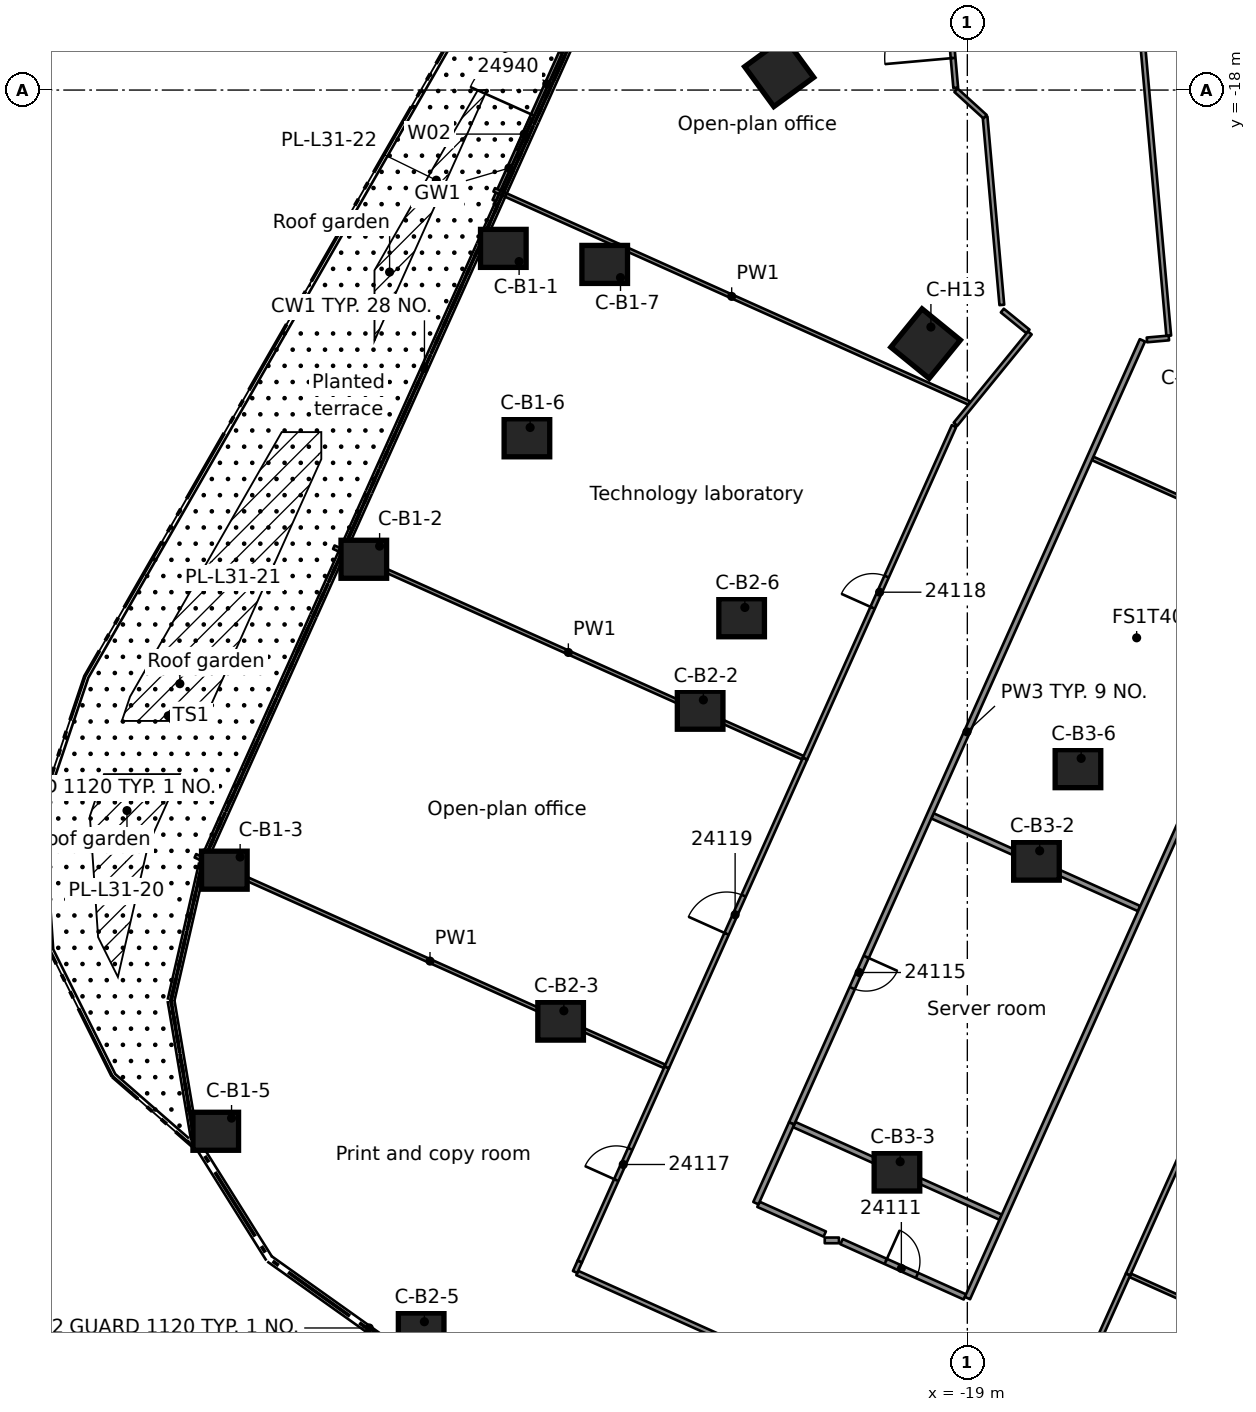
"""IFC4 building model, lengths in metres.
Left out: names, types, materials, properties, quantities, classifications, styles, units other than length and angle.
Written with IfcOpenShell. Run it as: python <this file> out.ifc"""

import sys

from ifc_helpers import new_model, si_unit, direction, frame, frame_2d, origin, origin_2d, place, context, subcontext, project, spatial, rectangle, extrude, element, fill, save


model = new_model("IFC4")
c1 = context("Model", 3, precision=1e-05, world=origin(), true_north=direction((0.0, 1.0)))
c2 = subcontext(c1, "Body", "Model", "MODEL_VIEW")
j1 = project(units=[si_unit("LENGTHUNIT", "METRE"), si_unit("PLANEANGLEUNIT", "RADIAN")], contexts=[c1])
p1 = place(None, origin())
s1 = spatial("IfcSite", under=j1, at=p1, CompositionType="ELEMENT")
p2 = place(p1, origin())
s2 = spatial("IfcBuilding", under=s1, at=p2, CompositionType="ELEMENT")
p3 = place(p2, frame((0.0, 0.0, 123.7)))
s3 = spatial("IfcBuildingStorey", under=s2, at=p3, CompositionType="ELEMENT", Elevation=123.7)
for number, where, z_axis, x_axis in (
    (1, (-31.21, -22.166, 0.0), (0.0, 0.0, 1.0), (1.0, 0.0, 0.0)),
    (2, (-34.881, -30.346, 0.0), (0.0, 0.0, 1.0), (1.0, 0.0, 0.0)),
    (3, (-38.551, -38.527, 0.0), (0.0, 0.0, 1.0), (1.0, 0.0, 0.0)),
    (4, (-38.777, -45.397, 0.0), (0.0, 0.0, 1.0), (1.0, 0.0, 0.0)),
    (5, (-30.589, -27.15, 0.0), (0.0, 0.0, 1.0), (1.0, 0.0, 0.0)),
    (6, (-28.542, -22.588, 0.0), (0.0, 0.0, 1.0), (1.0, 0.0, 0.0)),
    (7, (-26.031, -34.318, 0.0), (0.0, 0.0, 1.0), (1.0, 0.0, 0.0)),
    (8, (-29.702, -42.498, 0.0), (0.0, 0.0, 1.0), (1.0, 0.0, 0.0)),
    (9, (-33.372, -50.679, 0.0), (0.0, 0.0, 1.0), (1.0, 0.0, 0.0)),
    (10, (-24.939, -31.885, 0.0), (0.0, 0.0, 1.0), (1.0, 0.0, 0.0)),
    (11, (-17.181, -38.289, 0.0), (0.0, 0.0, 1.0), (1.0, 0.0, 0.0)),
    (12, (-20.852, -46.469, 0.0), (0.0, 0.0, 1.0), (1.0, 0.0, 0.0)),
    (13, (-16.089, -35.856, 0.0), (0.0, 0.0, 1.0), (1.0, 0.0, 0.0)),
):
    element("IfcColumn", number, at=place(p3, frame(where, z_axis=z_axis, x_axis=x_axis)), inside=s3, PredefinedType="COLUMN", context=c2, shape_type="SweptSolid", body=[
        extrude(rectangle(XDim=1.2, YDim=1.0, at=origin_2d()), origin(), (0.0, 0.0, 1.0), 3.5),
    ])
for number, where, z_axis, x_axis in (
    (14, (-20.098, -24.672, 0.0), (0.0, 0.0, 1.0), (-0.632, -0.775, 0.0)),
    (15, (-23.951, -17.526, 0.0), (0.0, 0.0, 1.0), (-0.807, -0.591, 0.0)),
):
    element("IfcColumn", number, at=place(p3, frame(where, z_axis=z_axis, x_axis=x_axis)), inside=s3, PredefinedType="COLUMN", context=c2, shape_type="SweptSolid", body=[
        extrude(rectangle(XDim=1.3, YDim=1.3, at=origin_2d()), origin(), (0.0, 0.0, 1.0), 3.5),
    ])
p4 = place(p3, frame((-31.447, -20.912, 0.0), z_axis=(0.0, 0.0, 1.0), x_axis=(0.409400034272, 0.912354981319, 0.0)))
e16 = element("IfcWall", 16, at=p4, inside=s3, PredefinedType="STANDARD", context=c2, shape_type="SweptSolid", body=[
    extrude(rectangle(XDim=4.705, YDim=0.1, at=frame_2d((2.353, 0.0))), origin(), (0.0, 0.0, 1.0), 3.1),
])
p5 = place(p4, frame((2.472, 0.0, 0.0)))
e17 = element("IfcOpeningElement", 17, at=p5, cuts=e16, PredefinedType="OPENING", context=c2, shape_type="SweptSolid", body=[
    extrude(rectangle(XDim=1.8, YDim=2.4, at=frame_2d((0.9, 1.2))), frame((0.0, 0.06, 0.0), z_axis=(0.0, -1.0, 0.0), x_axis=(1.0, 0.0, 0.0)), (0.0, 0.0, 1.0), 0.12),
])
p6 = place(p4, frame((1.472, 0.0, 0.0)))
e18 = element("IfcOpeningElement", 18, at=p6, cuts=e16, PredefinedType="OPENING", context=c2, shape_type="SweptSolid", body=[
    extrude(rectangle(XDim=0.9, YDim=2.4, at=frame_2d((0.45, 1.2))), frame((0.0, 0.06, 0.0), z_axis=(0.0, -1.0, 0.0), x_axis=(1.0, 0.0, 0.0)), (0.0, 0.0, 1.0), 0.12),
])
p7 = place(p3, frame((-19.305, -17.942, 0.0), z_axis=(0.0, 0.0, 1.0), x_axis=(-0.088649243985, 0.996062905414, 0.0)))
e19 = element("IfcWall", 19, at=p7, inside=s3, PredefinedType="PARTITIONING", context=c2, shape_type="SweptSolid", body=[
    extrude(rectangle(XDim=3.443, YDim=0.125, at=frame_2d((1.721, 0.0))), origin(), (0.0, 0.0, 1.0), 3.08),
])
p8 = place(p7, frame((0.788, 0.0, 0.0)))
e20 = element("IfcOpeningElement", 20, at=p8, cuts=e19, PredefinedType="OPENING", context=c2, shape_type="SweptSolid", body=[
    extrude(rectangle(XDim=1.8, YDim=2.1, at=frame_2d((0.9, 1.05))), frame((0.0, 0.073, 0.0), z_axis=(0.0, -1.0, 0.0), x_axis=(1.0, 0.0, 0.0)), (0.0, 0.0, 1.0), 0.145),
])
p9 = place(p3, frame((-18.533, -18.702, 0.0), z_axis=(0.0, 0.0, 1.0), x_axis=(0.088684868858, -0.99605973417, 0.0)))
e21 = element("IfcWall", 21, at=p9, inside=s3, PredefinedType="PARTITIONING", context=c2, shape_type="SweptSolid", body=[
    extrude(rectangle(XDim=4.972, YDim=0.125, at=frame_2d((2.486, 0.0))), origin(), (0.0, 0.0, 1.0), 3.08),
])
p10 = place(p3, frame((-14.589, -14.513, 0.0), z_axis=(0.0, 0.0, 1.0), x_axis=(0.088989077037, -0.99603260196, 0.0)))
e22 = element("IfcWall", 22, at=p10, inside=s3, PredefinedType="PARTITIONING", context=c2, shape_type="SweptSolid", body=[
    extrude(rectangle(XDim=9.992, YDim=0.125, at=frame_2d((4.996, 0.0))), origin(), (0.0, 0.0, 1.0), 3.08),
])
p11 = place(p3, frame((-18.079, -23.802, 0.0), z_axis=(0.0, 0.0, 1.0), x_axis=(0.775128356152, -0.631803791923, 0.0)))
e23 = element("IfcWall", 23, at=p11, inside=s3, PredefinedType="PARTITIONING", context=c2, shape_type="SweptSolid", body=[
    extrude(rectangle(XDim=0.872, YDim=0.125, at=frame_2d((0.436, 0.0))), origin(), (0.0, 0.0, 1.0), 3.08),
])
p12 = place(p3, frame((-17.239, -54.521, 0.0), z_axis=(0.0, 0.0, 1.0), x_axis=(-0.912380528424, 0.409343097355, 0.0)))
e24 = element("IfcWall", 24, at=p12, inside=s3, PredefinedType="PARTITIONING", context=c2, shape_type="SweptSolid", body=[
    extrude(rectangle(XDim=13.18, YDim=0.125, at=frame_2d((6.59, 0.0))), origin(), (0.0, 0.0, 1.0), 3.08),
])
p13 = place(p12, frame((2.792, 0.0, 0.0)))
e25 = element("IfcOpeningElement", 25, at=p13, cuts=e24, PredefinedType="OPENING", context=c2, shape_type="SweptSolid", body=[
    extrude(rectangle(XDim=0.9, YDim=2.1, at=frame_2d((0.45, 1.05))), frame((0.0, 0.073, 0.0), z_axis=(0.0, -1.0, 0.0), x_axis=(1.0, 0.0, 0.0)), (0.0, 0.0, 1.0), 0.145),
])
p14 = place(p3, frame((-24.496, -47.319, 0.0), z_axis=(0.0, 0.0, 1.0), x_axis=(0.912484662613, -0.409110914663, 0.0)))
e26 = element("IfcWall", 26, at=p14, inside=s3, PredefinedType="PARTITIONING", context=c2, shape_type="SweptSolid", body=[
    extrude(rectangle(XDim=1.911, YDim=0.15, at=frame_2d((0.956, 0.0))), origin(), (0.0, 0.0, 1.0), 3.08),
])
p15 = place(p3, frame((-22.31, -48.3, 0.0), z_axis=(0.0, 0.0, 1.0), x_axis=(0.912496069824, -0.409085470966, 0.0)))
e27 = element("IfcWall", 27, at=p15, inside=s3, PredefinedType="PARTITIONING", context=c2, shape_type="SweptSolid", body=[
    extrude(rectangle(XDim=3.556, YDim=0.15, at=frame_2d((1.778, 0.0))), origin(), (0.0, 0.0, 1.0), 3.08),
])
p16 = place(p15, frame((1.275, 0.0, 0.0)))
e28 = element("IfcOpeningElement", 28, at=p16, cuts=e27, PredefinedType="OPENING", context=c2, shape_type="SweptSolid", body=[
    extrude(rectangle(XDim=0.9, YDim=2.1, at=frame_2d((0.45, 1.05))), frame((0.0, 0.085, 0.0), z_axis=(0.0, -1.0, 0.0), x_axis=(1.0, 0.0, 0.0)), (0.0, 0.0, 1.0), 0.17),
])
p17 = place(p3, frame((-39.313, -38.149, 0.0), z_axis=(0.0, 0.0, 1.0), x_axis=(0.912365533099, -0.409376518638, 0.0)))
e29 = element("IfcWall", 29, at=p17, inside=s3, PredefinedType="PARTITIONING", context=c2, shape_type="SweptSolid", body=[
    extrude(rectangle(XDim=13.533, YDim=0.1, at=frame_2d((6.767, 0.0))), origin(), (0.0, 0.0, 1.0), 3.08),
])
p18 = place(p3, frame((-23.556, -45.22, 0.0), z_axis=(0.0, 0.0, 1.0), x_axis=(0.912409553787, -0.409278396886, 0.0)))
e30 = element("IfcWall", 30, at=p18, inside=s3, PredefinedType="PARTITIONING", context=c2, shape_type="SweptSolid", body=[
    extrude(rectangle(XDim=5.954, YDim=0.15, at=frame_2d((2.977, 0.0))), origin(), (0.0, 0.0, 1.0), 3.08),
])
p19 = place(p3, frame((-14.713, -49.188, 0.0), z_axis=(0.0, 0.0, 1.0), x_axis=(0.912374858899, -0.409355733865, 0.0)))
e31 = element("IfcWall", 31, at=p19, inside=s3, PredefinedType="PARTITIONING", context=c2, shape_type="SweptSolid", body=[
    extrude(rectangle(XDim=13.536, YDim=0.1, at=frame_2d((6.768, 0.0))), origin(), (0.0, 0.0, 1.0), 3.08),
])
p20 = place(p3, frame((-35.67, -30.029, 0.0), z_axis=(0.0, 0.0, 1.0), x_axis=(0.912365708641, -0.409376127413, 0.0)))
e32 = element("IfcWall", 32, at=p20, inside=s3, PredefinedType="PARTITIONING", context=c2, shape_type="SweptSolid", body=[
    extrude(rectangle(XDim=13.528, YDim=0.1, at=frame_2d((6.764, 0.0))), origin(), (0.0, 0.0, 1.0), 3.08),
])
p21 = place(p3, frame((-19.917, -37.098, 0.0), z_axis=(0.0, 0.0, 1.0), x_axis=(0.912388526433, -0.409325270211, 0.0)))
e33 = element("IfcWall", 33, at=p21, inside=s3, PredefinedType="PARTITIONING", context=c2, shape_type="SweptSolid", body=[
    extrude(rectangle(XDim=5.959, YDim=0.15, at=frame_2d((2.979, 0.0))), origin(), (0.0, 0.0, 1.0), 3.08),
])
p22 = place(p3, frame((-31.45, -20.625, 0.0), z_axis=(0.0, 0.0, 1.0), x_axis=(0.912363829072, -0.409380316334, 0.0)))
e34 = element("IfcWall", 34, at=p22, inside=s3, PredefinedType="PARTITIONING", context=c2, shape_type="SweptSolid", body=[
    extrude(rectangle(XDim=13.698, YDim=0.1, at=frame_2d((6.849, 0.0))), origin(), (0.0, 0.0, 1.0), 3.08),
])
p23 = place(p3, frame((-15.704, -27.692, 0.0), z_axis=(0.0, 0.0, 1.0), x_axis=(0.912424912587, -0.409244155597, 0.0)))
e35 = element("IfcWall", 35, at=p23, inside=s3, PredefinedType="PARTITIONING", context=c2, shape_type="SweptSolid", body=[
    extrude(rectangle(XDim=5.809, YDim=0.1, at=frame_2d((2.904, 0.0))), origin(), (0.0, 0.0, 1.0), 3.08),
])
p24 = place(p3, frame((-22.752, -48.268, 0.0), z_axis=(0.0, 0.0, 1.0), x_axis=(1.0, 0.0, 0.0)))
e36 = element("IfcWall", 36, at=p24, inside=s3, PredefinedType="PARTITIONING", context=c2, shape_type="SweptSolid", body=[
    extrude(rectangle(XDim=0.374, YDim=0.15, at=frame_2d((0.187, 0.0))), origin(), (0.0, 0.0, 1.0), 3.08),
])
p25 = place(p3, frame((-14.274, -24.574, 0.0), z_axis=(0.0, 0.0, 1.0), x_axis=(0.996111374158, 0.088102952687, 0.0)))
e37 = element("IfcWall", 37, at=p25, inside=s3, PredefinedType="PARTITIONING", context=c2, shape_type="SweptSolid", body=[
    extrude(rectangle(XDim=0.579, YDim=0.125, at=frame_2d((0.29, 0.0))), origin(), (0.0, 0.0, 1.0), 3.08),
])
p26 = place(p3, frame((-19.298, -18.005, 0.0), z_axis=(0.0, 0.0, 1.0), x_axis=(0.739245917037, -0.673435575348, 0.0)))
e38 = element("IfcWall", 38, at=p26, inside=s3, PredefinedType="PARTITIONING", context=c2, shape_type="SweptSolid", body=[
    extrude(rectangle(XDim=1.035, YDim=0.125, at=frame_2d((0.518, 0.0))), origin(), (0.0, 0.0, 1.0), 3.08),
])
p27 = place(p3, frame((-19.311, -26.793, 0.0), z_axis=(0.0, 0.0, 1.0), x_axis=(0.631476442345, 0.77539506238, 0.0)))
e39 = element("IfcWall", 39, at=p27, inside=s3, PredefinedType="PARTITIONING", context=c2, shape_type="SweptSolid", body=[
    extrude(rectangle(XDim=3.098, YDim=0.125, at=frame_2d((1.549, 0.0))), origin(), (0.0, 0.0, 1.0), 3.08),
])
p28 = place(p3, frame((-15.712, -51.26, 0.0), z_axis=(0.0, 0.0, 1.0), x_axis=(0.409583190249, 0.912272771854, 0.0)))
e40 = element("IfcWall", 40, at=p28, inside=s3, PredefinedType="PARTITIONING", context=c2, shape_type="SweptSolid", body=[
    extrude(rectangle(XDim=2.3, YDim=0.125, at=frame_2d((1.15, 0.0))), origin(), (0.0, 0.0, 1.0), 3.08),
])
p29 = place(p3, frame((-6.789, -31.374, 0.0), z_axis=(0.0, 0.0, 1.0), x_axis=(-0.409354309939, -0.912375497772, 0.0)))
e41 = element("IfcWall", 41, at=p29, inside=s3, PredefinedType="PARTITIONING", context=c2, shape_type="SweptSolid", body=[
    extrude(rectangle(XDim=19.496, YDim=0.125, at=frame_2d((9.748, 0.0))), origin(), (0.0, 0.0, 1.0), 3.08),
])
p30 = place(p29, frame((4.639, 0.0, 0.0)))
e42 = element("IfcOpeningElement", 42, at=p30, cuts=e41, PredefinedType="OPENING", context=c2, shape_type="SweptSolid", body=[
    extrude(rectangle(XDim=1.8, YDim=2.1, at=frame_2d((0.9, 1.05))), frame((0.0, 0.073, 0.0), z_axis=(0.0, -1.0, 0.0), x_axis=(1.0, 0.0, 0.0)), (0.0, 0.0, 1.0), 0.145),
])
p31 = place(p29, frame((14.697, 0.0, 0.0)))
e43 = element("IfcOpeningElement", 43, at=p31, cuts=e41, PredefinedType="OPENING", context=c2, shape_type="SweptSolid", body=[
    extrude(rectangle(XDim=0.9, YDim=2.1, at=frame_2d((0.45, 1.05))), frame((0.0, 0.073, 0.0), z_axis=(0.0, -1.0, 0.0), x_axis=(1.0, 0.0, 0.0)), (0.0, 0.0, 1.0), 0.145),
])
p32 = place(p3, frame((-18.997, -49.786, 0.0), z_axis=(0.0, 0.0, 1.0), x_axis=(0.409621859923, 0.912255409342, 0.0)))
e44 = element("IfcWall", 44, at=p32, inside=s3, PredefinedType="PARTITIONING", context=c2, shape_type="SweptSolid", body=[
    extrude(rectangle(XDim=21.091, YDim=0.15, at=frame_2d((10.545, 0.0))), origin(), (0.0, 0.0, 1.0), 3.08),
])
p33 = place(p32, frame((15.8, 0.0, 0.0)))
e45 = element("IfcOpeningElement", 45, at=p33, cuts=e44, PredefinedType="OPENING", context=c2, shape_type="SweptSolid", body=[
    extrude(rectangle(XDim=0.9, YDim=2.1, at=frame_2d((0.45, 1.05))), frame((0.0, 0.085, 0.0), z_axis=(0.0, -1.0, 0.0), x_axis=(1.0, 0.0, 0.0)), (0.0, 0.0, 1.0), 0.17),
])
p34 = place(p3, frame((-14.393, -24.585, 0.0), z_axis=(0.0, 0.0, 1.0), x_axis=(-0.408859666491, -0.912597267756, 0.0)))
e46 = element("IfcWall", 46, at=p34, inside=s3, PredefinedType="PARTITIONING", context=c2, shape_type="SweptSolid", body=[
    extrude(rectangle(XDim=22.577, YDim=0.15, at=frame_2d((11.289, 0.0))), origin(), (0.0, 0.0, 1.0), 3.08),
])
p35 = place(p34, frame((17.777, 0.0, 0.0)))
e47 = element("IfcOpeningElement", 47, at=p35, cuts=e46, PredefinedType="OPENING", context=c2, shape_type="SweptSolid", body=[
    extrude(rectangle(XDim=0.9, YDim=2.1, at=frame_2d((0.45, 1.05))), frame((0.0, 0.085, 0.0), z_axis=(0.0, -1.0, 0.0), x_axis=(1.0, 0.0, 0.0)), (0.0, 0.0, 1.0), 0.17),
])
p36 = place(p3, frame((-24.564, -47.288, 0.0), z_axis=(0.0, 0.0, 1.0), x_axis=(0.408677932569, 0.912678666033, 0.0)))
e48 = element("IfcWall", 48, at=p36, inside=s3, PredefinedType="PARTITIONING", context=c2, shape_type="SweptSolid", body=[
    extrude(rectangle(XDim=2.3, YDim=0.15, at=frame_2d((1.15, 0.0))), origin(), (0.0, 0.0, 1.0), 3.08),
])
p37 = place(p3, frame((-29.199, -48.826, 0.0), z_axis=(0.0, 0.0, 1.0), x_axis=(0.408903193062, 0.912577765839, 0.0)))
e49 = element("IfcWall", 49, at=p37, inside=s3, PredefinedType="PARTITIONING", context=c2, shape_type="SweptSolid", body=[
    extrude(rectangle(XDim=5.6, YDim=0.125, at=frame_2d((2.8, 0.0))), origin(), (0.0, 0.0, 1.0), 3.08),
])
p38 = place(p37, frame((2.35, 0.0, 0.0)))
e50 = element("IfcOpeningElement", 50, at=p38, cuts=e49, PredefinedType="OPENING", context=c2, shape_type="SweptSolid", body=[
    extrude(rectangle(XDim=0.9, YDim=2.1, at=frame_2d((0.45, 1.05))), frame((0.0, 0.073, 0.0), z_axis=(0.0, -1.0, 0.0), x_axis=(1.0, 0.0, 0.0)), (0.0, 0.0, 1.0), 0.145),
])
p39 = place(p3, frame((-23.271, -35.593, 0.0), z_axis=(0.0, 0.0, 1.0), x_axis=(0.408848301026, 0.9126023596, 0.0)))
e51 = element("IfcWall", 51, at=p39, inside=s3, PredefinedType="PARTITIONING", context=c2, shape_type="SweptSolid", body=[
    extrude(rectangle(XDim=9.59, YDim=0.125, at=frame_2d((4.795, 0.0))), origin(), (0.0, 0.0, 1.0), 3.08),
])
p40 = place(p39, frame((4.35, 0.0, 0.0)))
e52 = element("IfcOpeningElement", 52, at=p40, cuts=e51, PredefinedType="OPENING", context=c2, shape_type="SweptSolid", body=[
    extrude(rectangle(XDim=0.9, YDim=2.1, at=frame_2d((0.45, 1.05))), frame((0.0, 0.073, 0.0), z_axis=(0.0, -1.0, 0.0), x_axis=(1.0, 0.0, 0.0)), (0.0, 0.0, 1.0), 0.145),
])
p41 = place(p3, frame((-26.909, -43.715, 0.0), z_axis=(0.0, 0.0, 1.0), x_axis=(0.408776260382, 0.912634630588, 0.0)))
e53 = element("IfcWall", 53, at=p41, inside=s3, PredefinedType="PARTITIONING", context=c2, shape_type="SweptSolid", body=[
    extrude(rectangle(XDim=8.9, YDim=0.125, at=frame_2d((4.45, 0.0))), origin(), (0.0, 0.0, 1.0), 3.08),
])
p42 = place(p41, frame((3.85, 0.0, 0.0)))
e54 = element("IfcOpeningElement", 54, at=p42, cuts=e53, PredefinedType="OPENING", context=c2, shape_type="SweptSolid", body=[
    extrude(rectangle(XDim=1.1, YDim=2.1, at=frame_2d((0.55, 1.05))), frame((0.0, 0.073, 0.0), z_axis=(0.0, -1.0, 0.0), x_axis=(1.0, 0.0, 0.0)), (0.0, 0.0, 1.0), 0.145),
])
p43 = place(p3, frame((-29.321, -49.099, 0.0), z_axis=(0.0, 0.0, 1.0), x_axis=(0.407954532979, 0.913002244807, 0.0)))
e55 = element("IfcWall", 55, at=p43, inside=s3, PredefinedType="PARTITIONING", context=c2, shape_type="SweptSolid", body=[
    extrude(rectangle(XDim=0.299, YDim=0.125, at=frame_2d((0.15, 0.0))), origin(), (0.0, 0.0, 1.0), 3.08),
])
p44 = place(p5, origin())
e56 = element("IfcDoor", 56, at=p44, inside=s3, OperationType="DOUBLE_DOOR_SINGLE_SWING", PredefinedType="DOOR", context=c2, shape_type="SweptSolid", body=[
    extrude(rectangle(XDim=1.8, YDim=2.4, at=frame_2d((0.9, 1.2))), frame((0.0, 0.025, 0.0), z_axis=(0.0, -1.0, 0.0), x_axis=(1.0, 0.0, 0.0)), (0.0, 0.0, 1.0), 0.05),
])
fill(e17, e56)
p45 = place(p6, origin())
e57 = element("IfcWindow", 57, at=p45, inside=s3, PartitioningType="SINGLE_PANEL", PredefinedType="WINDOW", context=c2, shape_type="SweptSolid", body=[
    extrude(rectangle(XDim=0.9, YDim=2.4, at=frame_2d((0.45, 1.2))), frame((0.0, 0.03, 0.0), z_axis=(0.0, -1.0, 0.0), x_axis=(1.0, 0.0, 0.0)), (0.0, 0.0, 1.0), 0.06),
])
fill(e18, e57)
p46 = place(p16, origin())
e58 = element("IfcDoor", 58, at=p46, inside=s3, OperationType="SINGLE_SWING_LEFT", PredefinedType="DOOR", context=c2, shape_type="SweptSolid", body=[
    extrude(rectangle(XDim=0.9, YDim=2.1, at=frame_2d((0.45, 1.05))), frame((0.0, 0.025, 0.0), z_axis=(0.0, -1.0, 0.0), x_axis=(1.0, 0.0, 0.0)), (0.0, 0.0, 1.0), 0.05),
])
fill(e28, e58)
p47 = place(p35, origin())
e59 = element("IfcDoor", 59, at=p47, inside=s3, OperationType="SINGLE_SWING_RIGHT", PredefinedType="DOOR", context=c2, shape_type="SweptSolid", body=[
    extrude(rectangle(XDim=0.9, YDim=2.1, at=frame_2d((0.45, 1.05))), frame((0.0, 0.025, 0.0), z_axis=(0.0, -1.0, 0.0), x_axis=(1.0, 0.0, 0.0)), (0.0, 0.0, 1.0), 0.05),
])
fill(e47, e59)
p48 = place(p38, origin())
e60 = element("IfcDoor", 60, at=p48, inside=s3, OperationType="SINGLE_SWING_LEFT", PredefinedType="DOOR", context=c2, shape_type="SweptSolid", body=[
    extrude(rectangle(XDim=0.9, YDim=2.1, at=frame_2d((0.45, 1.05))), frame((0.0, 0.025, 0.0), z_axis=(0.0, -1.0, 0.0), x_axis=(1.0, 0.0, 0.0)), (0.0, 0.0, 1.0), 0.05),
])
fill(e50, e60)
p49 = place(p40, origin())
e61 = element("IfcDoor", 61, at=p49, inside=s3, OperationType="SINGLE_SWING_RIGHT", PredefinedType="DOOR", context=c2, shape_type="SweptSolid", body=[
    extrude(rectangle(XDim=0.9, YDim=2.1, at=frame_2d((0.45, 1.05))), frame((0.0, 0.025, 0.0), z_axis=(0.0, -1.0, 0.0), x_axis=(1.0, 0.0, 0.0)), (0.0, 0.0, 1.0), 0.05),
])
fill(e52, e61)
p50 = place(p42, origin())
e62 = element("IfcDoor", 62, at=p50, inside=s3, OperationType="SINGLE_SWING_LEFT", PredefinedType="DOOR", context=c2, shape_type="SweptSolid", body=[
    extrude(rectangle(XDim=1.1, YDim=2.1, at=frame_2d((0.55, 1.05))), frame((0.0, 0.025, 0.0), z_axis=(0.0, -1.0, 0.0), x_axis=(1.0, 0.0, 0.0)), (0.0, 0.0, 1.0), 0.05),
])
fill(e54, e62)
p51 = place(p8, origin())
e63 = element("IfcDoor", 63, at=p51, inside=s3, OperationType="DOUBLE_DOOR_SINGLE_SWING", PredefinedType="DOOR", context=c2, shape_type="SweptSolid", body=[
    extrude(rectangle(XDim=1.8, YDim=2.1, at=frame_2d((0.9, 1.05))), frame((0.0, 0.025, 0.0), z_axis=(0.0, -1.0, 0.0), x_axis=(1.0, 0.0, 0.0)), (0.0, 0.0, 1.0), 0.05),
])
fill(e20, e63)
save(model, sys.argv[1])
